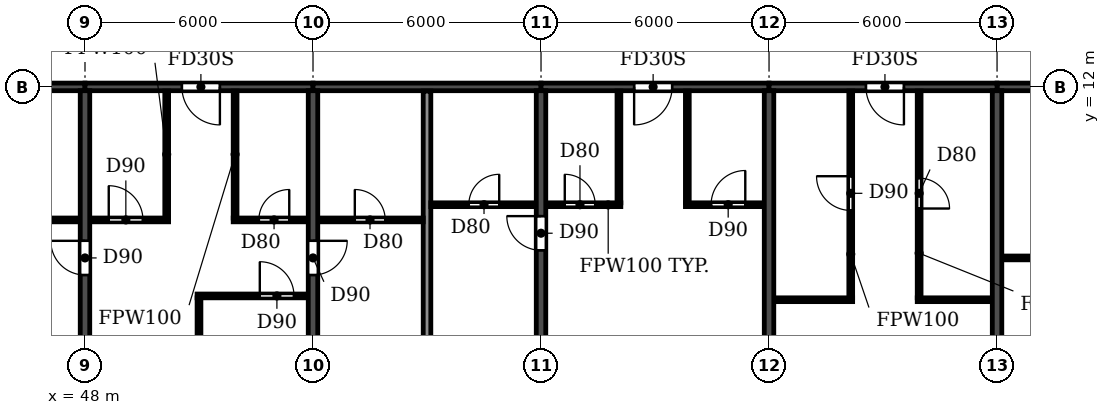
"""IFC4 building model, lengths in metres.
Left out: names, types, materials, properties, quantities, classifications, styles, units other than length and angle.
Written with IfcOpenShell. Run it as: python <this file> out.ifc"""

import sys

from ifc_helpers import new_model, si_unit, direction, frame, frame_2d, origin, place, context, subcontext, project, spatial, rectangle, extrude, element, fill, save


model = new_model("IFC4")
c1 = context("Model", 3, precision=1e-05, world=origin(), true_north=direction((0.0, 1.0)))
c2 = subcontext(c1, "Body", "Model", "MODEL_VIEW")
j1 = project(units=[si_unit("LENGTHUNIT", "METRE"), si_unit("PLANEANGLEUNIT", "RADIAN")], contexts=[c1])
p1 = place(None, origin())
s1 = spatial("IfcSite", under=j1, at=p1, CompositionType="ELEMENT")
p2 = place(p1, origin())
s2 = spatial("IfcBuilding", under=s1, at=p2, CompositionType="ELEMENT")
p3 = place(p2, frame((0.0, 0.0, 171.9)))
s3 = spatial("IfcBuildingStorey", under=s2, at=p3, CompositionType="ELEMENT", Elevation=171.9)
p4 = place(p3, frame((48.0, 0.2, 0.0), z_axis=(0.0, 0.0, 1.0), x_axis=(0.0, 1.0, 0.0)))
e1 = element("IfcWall", 1, at=p4, inside=s3, PredefinedType="SHEAR", context=c2, shape_type="SweptSolid", body=[
    extrude(rectangle(XDim=11.7, YDim=0.25, at=frame_2d((5.85, 0.0))), origin(), (0.0, 0.0, 1.0), 3.08),
])
p5 = place(p4, frame((6.85, 0.0, 0.0)))
e2 = element("IfcOpeningElement", 2, at=p5, cuts=e1, PredefinedType="OPENING", context=c2, shape_type="SweptSolid", body=[
    extrude(rectangle(XDim=0.9, YDim=2.1, at=frame_2d((0.45, 1.05))), frame((0.0, 0.135, 0.0), z_axis=(0.0, -1.0, 0.0), x_axis=(1.0, 0.0, 0.0)), (0.0, 0.0, 1.0), 0.27),
])
p6 = place(p3, frame((54.0, 0.2, 0.0), z_axis=(0.0, 0.0, 1.0), x_axis=(0.0, 1.0, 0.0)))
e3 = element("IfcWall", 3, at=p6, inside=s3, PredefinedType="SHEAR", context=c2, shape_type="SweptSolid", body=[
    extrude(rectangle(XDim=11.7, YDim=0.25, at=frame_2d((5.85, 0.0))), origin(), (0.0, 0.0, 1.0), 3.08),
])
p7 = place(p6, frame((6.85, 0.0, 0.0)))
e4 = element("IfcOpeningElement", 4, at=p7, cuts=e3, PredefinedType="OPENING", context=c2, shape_type="SweptSolid", body=[
    extrude(rectangle(XDim=0.9, YDim=2.1, at=frame_2d((0.45, 1.05))), frame((0.0, 0.135, 0.0), z_axis=(0.0, -1.0, 0.0), x_axis=(1.0, 0.0, 0.0)), (0.0, 0.0, 1.0), 0.27),
])
p8 = place(p3, frame((60.0, 0.2, 0.0), z_axis=(0.0, 0.0, 1.0), x_axis=(0.0, 1.0, 0.0)))
e5 = element("IfcWall", 5, at=p8, inside=s3, PredefinedType="SHEAR", context=c2, shape_type="SweptSolid", body=[
    extrude(rectangle(XDim=11.7, YDim=0.25, at=frame_2d((5.85, 0.0))), origin(), (0.0, 0.0, 1.0), 3.08),
])
p9 = place(p8, frame((7.5, 0.0, 0.0)))
e6 = element("IfcOpeningElement", 6, at=p9, cuts=e5, PredefinedType="OPENING", context=c2, shape_type="SweptSolid", body=[
    extrude(rectangle(XDim=0.9, YDim=2.1, at=frame_2d((0.45, 1.05))), frame((0.0, 0.135, 0.0), z_axis=(0.0, -1.0, 0.0), x_axis=(1.0, 0.0, 0.0)), (0.0, 0.0, 1.0), 0.27),
])
for number, where, z_axis, x_axis in (
    (7, (66.0, 0.2, 0.0), (0.0, 0.0, 1.0), (0.0, 1.0, 0.0)),
    (8, (72.0, 0.2, 0.0), (0.0, 0.0, 1.0), (0.0, 1.0, 0.0)),
):
    element("IfcWall", number, at=place(p3, frame(where, z_axis=z_axis, x_axis=x_axis)), inside=s3, PredefinedType="SHEAR", context=c2, shape_type="SweptSolid", body=[
        extrude(rectangle(XDim=11.7, YDim=0.25, at=frame_2d((5.85, 0.0))), origin(), (0.0, 0.0, 1.0), 3.08),
    ])
p10 = place(p3, frame((42.0, 12.0, 0.0), z_axis=(0.0, 0.0, 1.0), x_axis=(1.0, 0.0, 0.0)))
e9 = element("IfcWall", 9, at=p10, inside=s3, PredefinedType="SHEAR", context=c2, shape_type="SweptSolid", body=[
    extrude(rectangle(XDim=6.0, YDim=0.2, at=frame_2d((3.0, 0.0))), origin(), (0.0, 0.0, 1.0), 2.48),
])
p11 = place(p3, frame((48.0, 12.0, 0.0), z_axis=(0.0, 0.0, 1.0), x_axis=(1.0, 0.0, 0.0)))
e10 = element("IfcWall", 10, at=p11, inside=s3, PredefinedType="SHEAR", context=c2, shape_type="SweptSolid", body=[
    extrude(rectangle(XDim=6.0, YDim=0.2, at=frame_2d((3.0, 0.0))), origin(), (0.0, 0.0, 1.0), 2.48),
])
p12 = place(p11, frame((2.55, 0.0, 0.0)))
e11 = element("IfcOpeningElement", 11, at=p12, cuts=e10, PredefinedType="OPENING", context=c2, shape_type="SweptSolid", body=[
    extrude(rectangle(XDim=1.0, YDim=2.1, at=frame_2d((0.5, 1.05))), frame((0.0, 0.11, 0.0), z_axis=(0.0, -1.0, 0.0), x_axis=(1.0, 0.0, 0.0)), (0.0, 0.0, 1.0), 0.22),
])
p13 = place(p3, frame((54.0, 12.0, 0.0), z_axis=(0.0, 0.0, 1.0), x_axis=(1.0, 0.0, 0.0)))
e12 = element("IfcWall", 12, at=p13, inside=s3, PredefinedType="SHEAR", context=c2, shape_type="SweptSolid", body=[
    extrude(rectangle(XDim=6.0, YDim=0.2, at=frame_2d((3.0, 0.0))), origin(), (0.0, 0.0, 1.0), 2.48),
])
p14 = place(p3, frame((60.0, 12.0, 0.0), z_axis=(0.0, 0.0, 1.0), x_axis=(1.0, 0.0, 0.0)))
e13 = element("IfcWall", 13, at=p14, inside=s3, PredefinedType="SHEAR", context=c2, shape_type="SweptSolid", body=[
    extrude(rectangle(XDim=6.0, YDim=0.2, at=frame_2d((3.0, 0.0))), origin(), (0.0, 0.0, 1.0), 2.48),
])
p15 = place(p14, frame((2.45, 0.0, 0.0)))
e14 = element("IfcOpeningElement", 14, at=p15, cuts=e13, PredefinedType="OPENING", context=c2, shape_type="SweptSolid", body=[
    extrude(rectangle(XDim=1.0, YDim=2.1, at=frame_2d((0.5, 1.05))), frame((0.0, 0.11, 0.0), z_axis=(0.0, -1.0, 0.0), x_axis=(1.0, 0.0, 0.0)), (0.0, 0.0, 1.0), 0.22),
])
p16 = place(p3, frame((66.0, 12.0, 0.0), z_axis=(0.0, 0.0, 1.0), x_axis=(1.0, 0.0, 0.0)))
e15 = element("IfcWall", 15, at=p16, inside=s3, PredefinedType="SHEAR", context=c2, shape_type="SweptSolid", body=[
    extrude(rectangle(XDim=6.0, YDim=0.2, at=frame_2d((3.0, 0.0))), origin(), (0.0, 0.0, 1.0), 2.48),
])
p17 = place(p16, frame((2.55, 0.0, 0.0)))
e16 = element("IfcOpeningElement", 16, at=p17, cuts=e15, PredefinedType="OPENING", context=c2, shape_type="SweptSolid", body=[
    extrude(rectangle(XDim=1.0, YDim=2.1, at=frame_2d((0.5, 1.05))), frame((0.0, 0.11, 0.0), z_axis=(0.0, -1.0, 0.0), x_axis=(1.0, 0.0, 0.0)), (0.0, 0.0, 1.0), 0.22),
])
p18 = place(p3, frame((72.0, 12.0, 0.0), z_axis=(0.0, 0.0, 1.0), x_axis=(1.0, 0.0, 0.0)))
e17 = element("IfcWall", 17, at=p18, inside=s3, PredefinedType="SHEAR", context=c2, shape_type="SweptSolid", body=[
    extrude(rectangle(XDim=6.0, YDim=0.2, at=frame_2d((3.0, 0.0))), origin(), (0.0, 0.0, 1.0), 2.48),
])
p19 = place(p18, frame((2.45, 0.0, 0.0)))
e18 = element("IfcOpeningElement", 18, at=p19, cuts=e17, PredefinedType="OPENING", context=c2, shape_type="SweptSolid", body=[
    extrude(rectangle(XDim=1.0, YDim=2.1, at=frame_2d((0.5, 1.05))), frame((0.0, 0.11, 0.0), z_axis=(0.0, -1.0, 0.0), x_axis=(1.0, 0.0, 0.0)), (0.0, 0.0, 1.0), 0.22),
])
p20 = place(p3, frame((57.0, 0.06, 0.0), z_axis=(0.0, 0.0, 1.0), x_axis=(0.0, 1.0, 0.0)))
e19 = element("IfcWall", 19, at=p20, inside=s3, PredefinedType="PARTITIONING", context=c2, shape_type="SweptSolid", body=[
    extrude(rectangle(XDim=11.83, YDim=0.2, at=frame_2d((5.915, 0.0))), origin(), (0.0, 0.0, 1.0), 3.08),
])
p21 = place(p3, frame((66.135, 6.4, 0.0), z_axis=(0.0, 0.0, 1.0), x_axis=(1.0, 0.0, 0.0)))
e20 = element("IfcWall", 20, at=p21, inside=s3, PredefinedType="PARTITIONING", context=c2, shape_type="SweptSolid", body=[
    extrude(rectangle(XDim=2.065, YDim=0.1, at=frame_2d((1.032, 0.0))), origin(), (0.0, 0.0, 1.0), 3.08),
])
p22 = place(p3, frame((69.9, 6.4, 0.0), z_axis=(0.0, 0.0, 1.0), x_axis=(1.0, 0.0, 0.0)))
e21 = element("IfcWall", 21, at=p22, inside=s3, PredefinedType="PARTITIONING", context=c2, shape_type="SweptSolid", body=[
    extrude(rectangle(XDim=1.965, YDim=0.1, at=frame_2d((0.982, 0.0))), origin(), (0.0, 0.0, 1.0), 3.08),
])
p23 = place(p3, frame((50.95, 6.5, 0.0), z_axis=(0.0, 0.0, 1.0), x_axis=(1.0, 0.0, 0.0)))
e22 = element("IfcWall", 22, at=p23, inside=s3, PredefinedType="PARTITIONING", context=c2, shape_type="SweptSolid", body=[
    extrude(rectangle(XDim=2.915, YDim=0.1, at=frame_2d((1.458, 0.0))), origin(), (0.0, 0.0, 1.0), 3.08),
])
p24 = place(p23, frame((1.65, 0.0, 0.0)))
e23 = element("IfcOpeningElement", 23, at=p24, cuts=e22, PredefinedType="OPENING", context=c2, shape_type="SweptSolid", body=[
    extrude(rectangle(XDim=0.9, YDim=2.1, at=frame_2d((0.45, 1.05))), frame((0.0, 0.06, 0.0), z_axis=(0.0, -1.0, 0.0), x_axis=(1.0, 0.0, 0.0)), (0.0, 0.0, 1.0), 0.12),
])
p25 = place(p3, frame((72.135, 7.5, 0.0), z_axis=(0.0, 0.0, 1.0), x_axis=(1.0, 0.0, 0.0)))
e24 = element("IfcWall", 24, at=p25, inside=s3, PredefinedType="PARTITIONING", context=c2, shape_type="SweptSolid", body=[
    extrude(rectangle(XDim=1.965, YDim=0.1, at=frame_2d((0.982, 0.0))), origin(), (0.0, 0.0, 1.0), 3.08),
])
p26 = place(p3, frame((45.1, 8.5, 0.0), z_axis=(0.0, 0.0, 1.0), x_axis=(1.0, 0.0, 0.0)))
e25 = element("IfcWall", 25, at=p26, inside=s3, PredefinedType="PARTITIONING", context=c2, shape_type="SweptSolid", body=[
    extrude(rectangle(XDim=2.765, YDim=0.1, at=frame_2d((1.382, 0.0))), origin(), (0.0, 0.0, 1.0), 3.08),
])
p27 = place(p26, frame((1.0, 0.0, 0.0)))
e26 = element("IfcOpeningElement", 26, at=p27, cuts=e25, PredefinedType="OPENING", context=c2, shape_type="SweptSolid", body=[
    extrude(rectangle(XDim=0.8, YDim=2.1, at=frame_2d((0.4, 1.05))), frame((0.0, 0.06, 0.0), z_axis=(0.0, -1.0, 0.0), x_axis=(1.0, 0.0, 0.0)), (0.0, 0.0, 1.0), 0.12),
])
p28 = place(p3, frame((48.135, 8.5, 0.0), z_axis=(0.0, 0.0, 1.0), x_axis=(1.0, 0.0, 0.0)))
e27 = element("IfcWall", 27, at=p28, inside=s3, PredefinedType="PARTITIONING", context=c2, shape_type="SweptSolid", body=[
    extrude(rectangle(XDim=2.065, YDim=0.1, at=frame_2d((1.032, 0.0))), origin(), (0.0, 0.0, 1.0), 3.08),
])
p29 = place(p28, frame((0.49, 0.0, 0.0)))
e28 = element("IfcOpeningElement", 28, at=p29, cuts=e27, PredefinedType="OPENING", context=c2, shape_type="SweptSolid", body=[
    extrude(rectangle(XDim=0.9, YDim=2.1, at=frame_2d((0.45, 1.05))), frame((0.0, 0.06, 0.0), z_axis=(0.0, -1.0, 0.0), x_axis=(1.0, 0.0, 0.0)), (0.0, 0.0, 1.0), 0.12),
])
p30 = place(p3, frame((51.9, 8.5, 0.0), z_axis=(0.0, 0.0, 1.0), x_axis=(1.0, 0.0, 0.0)))
e29 = element("IfcWall", 29, at=p30, inside=s3, PredefinedType="PARTITIONING", context=c2, shape_type="SweptSolid", body=[
    extrude(rectangle(XDim=1.965, YDim=0.1, at=frame_2d((0.982, 0.0))), origin(), (0.0, 0.0, 1.0), 3.08),
])
p31 = place(p30, frame((0.675, 0.0, 0.0)))
e30 = element("IfcOpeningElement", 30, at=p31, cuts=e29, PredefinedType="OPENING", context=c2, shape_type="SweptSolid", body=[
    extrude(rectangle(XDim=0.8, YDim=2.1, at=frame_2d((0.4, 1.05))), frame((0.0, 0.06, 0.0), z_axis=(0.0, -1.0, 0.0), x_axis=(1.0, 0.0, 0.0)), (0.0, 0.0, 1.0), 0.12),
])
p32 = place(p3, frame((54.135, 8.5, 0.0), z_axis=(0.0, 0.0, 1.0), x_axis=(1.0, 0.0, 0.0)))
e31 = element("IfcWall", 31, at=p32, inside=s3, PredefinedType="PARTITIONING", context=c2, shape_type="SweptSolid", body=[
    extrude(rectangle(XDim=2.765, YDim=0.1, at=frame_2d((1.382, 0.0))), origin(), (0.0, 0.0, 1.0), 3.08),
])
p33 = place(p32, frame((0.965, 0.0, 0.0)))
e32 = element("IfcOpeningElement", 32, at=p33, cuts=e31, PredefinedType="OPENING", context=c2, shape_type="SweptSolid", body=[
    extrude(rectangle(XDim=0.8, YDim=2.1, at=frame_2d((0.4, 1.05))), frame((0.0, 0.06, 0.0), z_axis=(0.0, -1.0, 0.0), x_axis=(1.0, 0.0, 0.0)), (0.0, 0.0, 1.0), 0.12),
])
p34 = place(p3, frame((57.1, 8.9, 0.0), z_axis=(0.0, 0.0, 1.0), x_axis=(1.0, 0.0, 0.0)))
e33 = element("IfcWall", 33, at=p34, inside=s3, PredefinedType="PARTITIONING", context=c2, shape_type="SweptSolid", body=[
    extrude(rectangle(XDim=2.765, YDim=0.1, at=frame_2d((1.382, 0.0))), origin(), (0.0, 0.0, 1.0), 3.08),
])
p35 = place(p34, frame((1.0, 0.0, 0.0)))
e34 = element("IfcOpeningElement", 34, at=p35, cuts=e33, PredefinedType="OPENING", context=c2, shape_type="SweptSolid", body=[
    extrude(rectangle(XDim=0.8, YDim=2.1, at=frame_2d((0.4, 1.05))), frame((0.0, 0.06, 0.0), z_axis=(0.0, -1.0, 0.0), x_axis=(1.0, 0.0, 0.0)), (0.0, 0.0, 1.0), 0.12),
])
p36 = place(p3, frame((60.135, 8.9, 0.0), z_axis=(0.0, 0.0, 1.0), x_axis=(1.0, 0.0, 0.0)))
e35 = element("IfcWall", 35, at=p36, inside=s3, PredefinedType="PARTITIONING", context=c2, shape_type="SweptSolid", body=[
    extrude(rectangle(XDim=1.965, YDim=0.1, at=frame_2d((0.982, 0.0))), origin(), (0.0, 0.0, 1.0), 3.08),
])
p37 = place(p36, frame((0.49, 0.0, 0.0)))
e36 = element("IfcOpeningElement", 36, at=p37, cuts=e35, PredefinedType="OPENING", context=c2, shape_type="SweptSolid", body=[
    extrude(rectangle(XDim=0.8, YDim=2.1, at=frame_2d((0.4, 1.05))), frame((0.0, 0.06, 0.0), z_axis=(0.0, -1.0, 0.0), x_axis=(1.0, 0.0, 0.0)), (0.0, 0.0, 1.0), 0.12),
])
p38 = place(p3, frame((63.8, 8.9, 0.0), z_axis=(0.0, 0.0, 1.0), x_axis=(1.0, 0.0, 0.0)))
e37 = element("IfcWall", 37, at=p38, inside=s3, PredefinedType="PARTITIONING", context=c2, shape_type="SweptSolid", body=[
    extrude(rectangle(XDim=2.065, YDim=0.1, at=frame_2d((1.032, 0.0))), origin(), (0.0, 0.0, 1.0), 3.08),
])
p39 = place(p38, frame((0.675, 0.0, 0.0)))
e38 = element("IfcOpeningElement", 38, at=p39, cuts=e37, PredefinedType="OPENING", context=c2, shape_type="SweptSolid", body=[
    extrude(rectangle(XDim=0.9, YDim=2.1, at=frame_2d((0.45, 1.05))), frame((0.0, 0.06, 0.0), z_axis=(0.0, -1.0, 0.0), x_axis=(1.0, 0.0, 0.0)), (0.0, 0.0, 1.0), 0.12),
])
p40 = place(p3, frame((50.15, 8.55, 0.0), z_axis=(0.0, 0.0, 1.0), x_axis=(0.0, 1.0, 0.0)))
e39 = element("IfcWall", 39, at=p40, inside=s3, PredefinedType="PARTITIONING", context=c2, shape_type="SweptSolid", body=[
    extrude(rectangle(XDim=3.34, YDim=0.1, at=frame_2d((1.67, 0.0))), origin(), (0.0, 0.0, 1.0), 3.08),
])
p41 = place(p3, frame((51.0, 0.06, 0.0), z_axis=(0.0, 0.0, 1.0), x_axis=(0.0, 1.0, 0.0)))
e40 = element("IfcWall", 40, at=p41, inside=s3, PredefinedType="PARTITIONING", context=c2, shape_type="SweptSolid", body=[
    extrude(rectangle(XDim=6.39, YDim=0.1, at=frame_2d((3.195, 0.0))), origin(), (0.0, 0.0, 1.0), 3.08),
])
p42 = place(p3, frame((51.95, 8.55, 0.0), z_axis=(0.0, 0.0, 1.0), x_axis=(0.0, 1.0, 0.0)))
e41 = element("IfcWall", 41, at=p42, inside=s3, PredefinedType="PARTITIONING", context=c2, shape_type="SweptSolid", body=[
    extrude(rectangle(XDim=3.34, YDim=0.1, at=frame_2d((1.67, 0.0))), origin(), (0.0, 0.0, 1.0), 3.08),
])
for number, where, z_axis, x_axis in (
    (42, (62.05, 8.95, 0.0), (0.0, 0.0, 1.0), (0.0, 1.0, 0.0)),
    (43, (63.85, 8.95, 0.0), (0.0, 0.0, 1.0), (0.0, 1.0, 0.0)),
):
    element("IfcWall", number, at=place(p3, frame(where, z_axis=z_axis, x_axis=x_axis)), inside=s3, PredefinedType="PARTITIONING", context=c2, shape_type="SweptSolid", body=[
        extrude(rectangle(XDim=2.94, YDim=0.1, at=frame_2d((1.47, 0.0))), origin(), (0.0, 0.0, 1.0), 3.08),
    ])
p43 = place(p3, frame((68.15, 6.45, 0.0), z_axis=(0.0, 0.0, 1.0), x_axis=(0.0, 1.0, 0.0)))
e44 = element("IfcWall", 44, at=p43, inside=s3, PredefinedType="PARTITIONING", context=c2, shape_type="SweptSolid", body=[
    extrude(rectangle(XDim=5.44, YDim=0.1, at=frame_2d((2.72, 0.0))), origin(), (0.0, 0.0, 1.0), 3.08),
])
p44 = place(p43, frame((2.3, 0.0, 0.0)))
e45 = element("IfcOpeningElement", 45, at=p44, cuts=e44, PredefinedType="OPENING", context=c2, shape_type="SweptSolid", body=[
    extrude(rectangle(XDim=0.9, YDim=2.1, at=frame_2d((0.45, 1.05))), frame((0.0, 0.06, 0.0), z_axis=(0.0, -1.0, 0.0), x_axis=(1.0, 0.0, 0.0)), (0.0, 0.0, 1.0), 0.12),
])
p45 = place(p3, frame((69.95, 6.45, 0.0), z_axis=(0.0, 0.0, 1.0), x_axis=(0.0, 1.0, 0.0)))
e46 = element("IfcWall", 46, at=p45, inside=s3, PredefinedType="PARTITIONING", context=c2, shape_type="SweptSolid", body=[
    extrude(rectangle(XDim=5.44, YDim=0.1, at=frame_2d((2.72, 0.0))), origin(), (0.0, 0.0, 1.0), 3.08),
])
p46 = place(p45, frame((2.35, 0.0, 0.0)))
e47 = element("IfcOpeningElement", 47, at=p46, cuts=e46, PredefinedType="OPENING", context=c2, shape_type="SweptSolid", body=[
    extrude(rectangle(XDim=0.8, YDim=2.1, at=frame_2d((0.4, 1.05))), frame((0.0, 0.06, 0.0), z_axis=(0.0, -1.0, 0.0), x_axis=(1.0, 0.0, 0.0)), (0.0, 0.0, 1.0), 0.12),
])
p47 = place(p33, origin())
e48 = element("IfcDoor", 48, at=p47, inside=s3, OperationType="SINGLE_SWING_LEFT", PredefinedType="DOOR", context=c2, shape_type="SweptSolid", body=[
    extrude(rectangle(XDim=0.8, YDim=2.1, at=frame_2d((0.4, 1.05))), frame((0.0, 0.025, 0.0), z_axis=(0.0, -1.0, 0.0), x_axis=(1.0, 0.0, 0.0)), (0.0, 0.0, 1.0), 0.05),
])
fill(e32, e48)
p48 = place(p5, origin())
e49 = element("IfcDoor", 49, at=p48, inside=s3, OperationType="SINGLE_SWING_RIGHT", PredefinedType="DOOR", context=c2, shape_type="SweptSolid", body=[
    extrude(rectangle(XDim=0.9, YDim=2.1, at=frame_2d((0.45, 1.05))), frame((0.0, 0.025, 0.0), z_axis=(0.0, -1.0, 0.0), x_axis=(1.0, 0.0, 0.0)), (0.0, 0.0, 1.0), 0.05),
])
fill(e2, e49)
p49 = place(p29, origin())
e50 = element("IfcDoor", 50, at=p49, inside=s3, OperationType="SINGLE_SWING_LEFT", PredefinedType="DOOR", context=c2, shape_type="SweptSolid", body=[
    extrude(rectangle(XDim=0.9, YDim=2.1, at=frame_2d((0.45, 1.05))), frame((0.0, 0.025, 0.0), z_axis=(0.0, -1.0, 0.0), x_axis=(1.0, 0.0, 0.0)), (0.0, 0.0, 1.0), 0.05),
])
fill(e28, e50)
p50 = place(p12, frame((1.0, 0.0, 0.0), z_axis=(0.0, 0.0, 1.0), x_axis=(-1.0, 0.0, 0.0)))
e51 = element("IfcDoor", 51, at=p50, inside=s3, OperationType="SINGLE_SWING_LEFT", PredefinedType="DOOR", context=c2, shape_type="SweptSolid", body=[
    extrude(rectangle(XDim=1.0, YDim=2.1, at=frame_2d((0.5, 1.05))), frame((0.0, 0.025, 0.0), z_axis=(0.0, -1.0, 0.0), x_axis=(1.0, 0.0, 0.0)), (0.0, 0.0, 1.0), 0.05),
])
fill(e11, e51)
p51 = place(p31, origin())
e52 = element("IfcDoor", 52, at=p51, inside=s3, OperationType="SINGLE_SWING_RIGHT", PredefinedType="DOOR", context=c2, shape_type="SweptSolid", body=[
    extrude(rectangle(XDim=0.8, YDim=2.1, at=frame_2d((0.4, 1.05))), frame((0.0, 0.025, 0.0), z_axis=(0.0, -1.0, 0.0), x_axis=(1.0, 0.0, 0.0)), (0.0, 0.0, 1.0), 0.05),
])
fill(e30, e52)
p52 = place(p24, origin())
e53 = element("IfcDoor", 53, at=p52, inside=s3, OperationType="SINGLE_SWING_LEFT", PredefinedType="DOOR", context=c2, shape_type="SweptSolid", body=[
    extrude(rectangle(XDim=0.9, YDim=2.1, at=frame_2d((0.45, 1.05))), frame((0.0, 0.025, 0.0), z_axis=(0.0, -1.0, 0.0), x_axis=(1.0, 0.0, 0.0)), (0.0, 0.0, 1.0), 0.05),
])
fill(e23, e53)
p53 = place(p7, frame((0.9, 0.0, 0.0), z_axis=(0.0, 0.0, 1.0), x_axis=(-1.0, 0.0, 0.0)))
e54 = element("IfcDoor", 54, at=p53, inside=s3, OperationType="SINGLE_SWING_LEFT", PredefinedType="DOOR", context=c2, shape_type="SweptSolid", body=[
    extrude(rectangle(XDim=0.9, YDim=2.1, at=frame_2d((0.45, 1.05))), frame((0.0, 0.025, 0.0), z_axis=(0.0, -1.0, 0.0), x_axis=(1.0, 0.0, 0.0)), (0.0, 0.0, 1.0), 0.05),
])
fill(e4, e54)
p54 = place(p35, origin())
e55 = element("IfcDoor", 55, at=p54, inside=s3, OperationType="SINGLE_SWING_RIGHT", PredefinedType="DOOR", context=c2, shape_type="SweptSolid", body=[
    extrude(rectangle(XDim=0.8, YDim=2.1, at=frame_2d((0.4, 1.05))), frame((0.0, 0.025, 0.0), z_axis=(0.0, -1.0, 0.0), x_axis=(1.0, 0.0, 0.0)), (0.0, 0.0, 1.0), 0.05),
])
fill(e34, e55)
p55 = place(p9, origin())
e56 = element("IfcDoor", 56, at=p55, inside=s3, OperationType="SINGLE_SWING_RIGHT", PredefinedType="DOOR", context=c2, shape_type="SweptSolid", body=[
    extrude(rectangle(XDim=0.9, YDim=2.1, at=frame_2d((0.45, 1.05))), frame((0.0, 0.025, 0.0), z_axis=(0.0, -1.0, 0.0), x_axis=(1.0, 0.0, 0.0)), (0.0, 0.0, 1.0), 0.05),
])
fill(e6, e56)
p56 = place(p37, origin())
e57 = element("IfcDoor", 57, at=p56, inside=s3, OperationType="SINGLE_SWING_LEFT", PredefinedType="DOOR", context=c2, shape_type="SweptSolid", body=[
    extrude(rectangle(XDim=0.8, YDim=2.1, at=frame_2d((0.4, 1.05))), frame((0.0, 0.025, 0.0), z_axis=(0.0, -1.0, 0.0), x_axis=(1.0, 0.0, 0.0)), (0.0, 0.0, 1.0), 0.05),
])
fill(e36, e57)
p57 = place(p15, frame((1.0, 0.0, 0.0), z_axis=(0.0, 0.0, 1.0), x_axis=(-1.0, 0.0, 0.0)))
e58 = element("IfcDoor", 58, at=p57, inside=s3, OperationType="SINGLE_SWING_RIGHT", PredefinedType="DOOR", context=c2, shape_type="SweptSolid", body=[
    extrude(rectangle(XDim=1.0, YDim=2.1, at=frame_2d((0.5, 1.05))), frame((0.0, 0.025, 0.0), z_axis=(0.0, -1.0, 0.0), x_axis=(1.0, 0.0, 0.0)), (0.0, 0.0, 1.0), 0.05),
])
fill(e14, e58)
p58 = place(p39, origin())
e59 = element("IfcDoor", 59, at=p58, inside=s3, OperationType="SINGLE_SWING_RIGHT", PredefinedType="DOOR", context=c2, shape_type="SweptSolid", body=[
    extrude(rectangle(XDim=0.9, YDim=2.1, at=frame_2d((0.45, 1.05))), frame((0.0, 0.025, 0.0), z_axis=(0.0, -1.0, 0.0), x_axis=(1.0, 0.0, 0.0)), (0.0, 0.0, 1.0), 0.05),
])
fill(e38, e59)
p59 = place(p44, origin())
e60 = element("IfcDoor", 60, at=p59, inside=s3, OperationType="SINGLE_SWING_RIGHT", PredefinedType="DOOR", context=c2, shape_type="SweptSolid", body=[
    extrude(rectangle(XDim=0.9, YDim=2.1, at=frame_2d((0.45, 1.05))), frame((0.0, 0.025, 0.0), z_axis=(0.0, -1.0, 0.0), x_axis=(1.0, 0.0, 0.0)), (0.0, 0.0, 1.0), 0.05),
])
fill(e45, e60)
p60 = place(p17, frame((1.0, 0.0, 0.0), z_axis=(0.0, 0.0, 1.0), x_axis=(-1.0, 0.0, 0.0)))
e61 = element("IfcDoor", 61, at=p60, inside=s3, OperationType="SINGLE_SWING_LEFT", PredefinedType="DOOR", context=c2, shape_type="SweptSolid", body=[
    extrude(rectangle(XDim=1.0, YDim=2.1, at=frame_2d((0.5, 1.05))), frame((0.0, 0.025, 0.0), z_axis=(0.0, -1.0, 0.0), x_axis=(1.0, 0.0, 0.0)), (0.0, 0.0, 1.0), 0.05),
])
fill(e16, e61)
p61 = place(p46, frame((0.8, 0.0, 0.0), z_axis=(0.0, 0.0, 1.0), x_axis=(-1.0, 0.0, 0.0)))
e62 = element("IfcDoor", 62, at=p61, inside=s3, OperationType="SINGLE_SWING_RIGHT", PredefinedType="DOOR", context=c2, shape_type="SweptSolid", body=[
    extrude(rectangle(XDim=0.8, YDim=2.1, at=frame_2d((0.4, 1.05))), frame((0.0, 0.025, 0.0), z_axis=(0.0, -1.0, 0.0), x_axis=(1.0, 0.0, 0.0)), (0.0, 0.0, 1.0), 0.05),
])
fill(e47, e62)
save(model, sys.argv[1])
